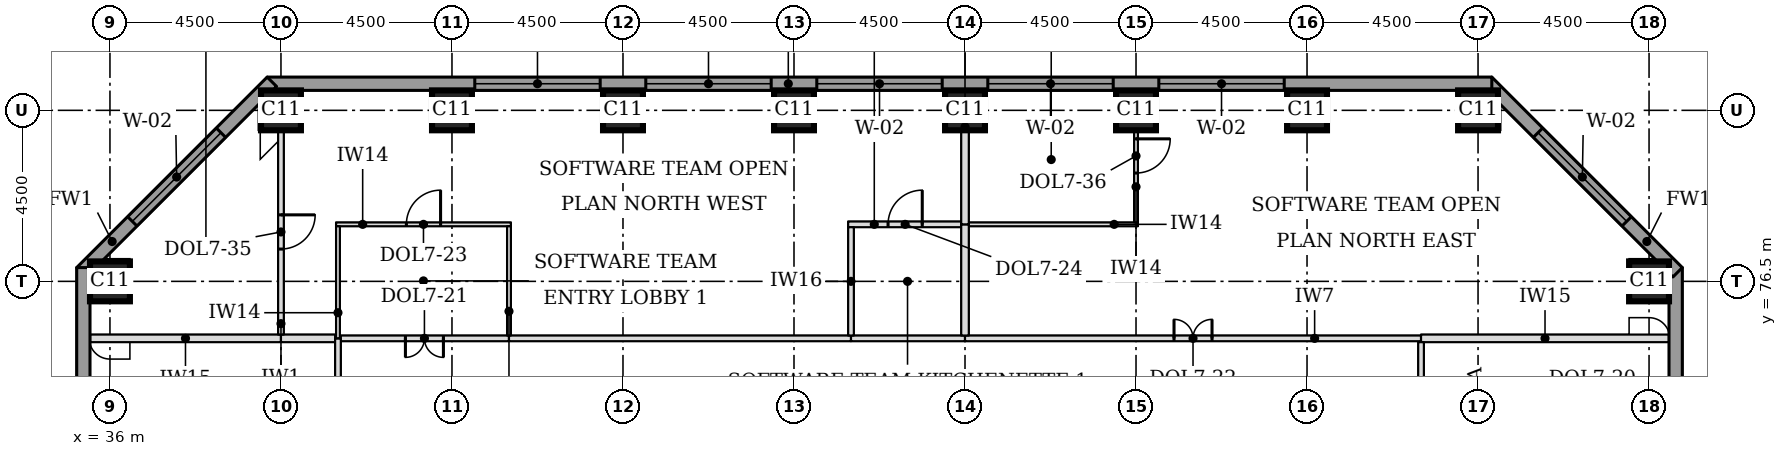
"""IFC4 building model, lengths in metres.
Left out: names, types, materials, properties, quantities, classifications, styles, units other than length and angle.
Written with IfcOpenShell. Run it as: python <this file> out.ifc"""

import sys

from ifc_helpers import new_model, si_unit, direction, frame, frame_2d, origin, origin_2d, place, context, subcontext, project, spatial, rectangle, extrude, element, fill, save


model = new_model("IFC4")
c1 = context("Model", 3, precision=1e-05, world=origin(), true_north=direction((0.0, 1.0)))
c2 = subcontext(c1, "Body", "Model", "MODEL_VIEW")
j1 = project(units=[si_unit("LENGTHUNIT", "METRE"), si_unit("PLANEANGLEUNIT", "RADIAN")], contexts=[c1])
p1 = place(None, origin())
s1 = spatial("IfcSite", under=j1, at=p1, CompositionType="ELEMENT")
p2 = place(p1, origin())
s2 = spatial("IfcBuilding", under=s1, at=p2, CompositionType="ELEMENT")
p3 = place(p2, frame((0.0, 0.0, 134.4)))
s3 = spatial("IfcBuildingStorey", under=s2, at=p3, CompositionType="ELEMENT", Elevation=134.4)
for number, where, z_axis, x_axis in (
    (1, (36.0, 76.5, 0.0), (0.0, 0.0, 1.0), (1.0, 0.0, 0.0)),
    (2, (76.5, 76.5, 0.0), (0.0, 0.0, 1.0), (1.0, 0.0, 0.0)),
    (3, (40.5, 81.0, 0.0), (0.0, 0.0, 1.0), (1.0, 0.0, 0.0)),
    (4, (45.0, 81.0, 0.0), (0.0, 0.0, 1.0), (1.0, 0.0, 0.0)),
    (5, (49.5, 81.0, 0.0), (0.0, 0.0, 1.0), (1.0, 0.0, 0.0)),
    (6, (54.0, 81.0, 0.0), (0.0, 0.0, 1.0), (1.0, 0.0, 0.0)),
    (7, (58.5, 81.0, 0.0), (0.0, 0.0, 1.0), (1.0, 0.0, 0.0)),
    (8, (63.0, 81.0, 0.0), (0.0, 0.0, 1.0), (1.0, 0.0, 0.0)),
    (9, (67.5, 81.0, 0.0), (0.0, 0.0, 1.0), (1.0, 0.0, 0.0)),
    (10, (72.0, 81.0, 0.0), (0.0, 0.0, 1.0), (1.0, 0.0, 0.0)),
):
    element("IfcColumn", number, at=place(p3, frame(where, z_axis=z_axis, x_axis=x_axis)), inside=s3, PredefinedType="COLUMN", context=c2, shape_type="SweptSolid", body=[
        extrude(rectangle(XDim=1.05, YDim=1.05, at=origin_2d()), origin(), (0.0, 0.0, 1.0), 3.7),
    ])
p4 = place(p3, frame((77.2, 44.638, 0.0), z_axis=(0.0, 0.0, 1.0), x_axis=(0.0, 1.0, 0.0)))
e11 = element("IfcWall", 11, at=p4, inside=s3, PredefinedType="STANDARD", context=c2, shape_type="SweptSolid", body=[
    extrude(rectangle(XDim=32.225, YDim=0.35, at=frame_2d((16.112, 0.0))), origin(), (0.0, 0.0, 1.0), 3.525),
])
p5 = place(p4, frame((5.462, 0.0, 0.9)))
e12 = element("IfcOpeningElement", 12, at=p5, cuts=e11, PredefinedType="OPENING", context=c2, shape_type="SweptSolid", body=[
    extrude(rectangle(XDim=3.3, YDim=1.9, at=frame_2d((1.65, 0.95))), frame((0.0, 0.185, 0.0), z_axis=(0.0, -1.0, 0.0), x_axis=(1.0, 0.0, 0.0)), (0.0, 0.0, 1.0), 0.37),
])
p6 = place(p4, frame((9.962, 0.0, 0.9)))
e13 = element("IfcOpeningElement", 13, at=p6, cuts=e11, PredefinedType="OPENING", context=c2, shape_type="SweptSolid", body=[
    extrude(rectangle(XDim=3.3, YDim=1.9, at=frame_2d((1.65, 0.95))), frame((0.0, 0.185, 0.0), z_axis=(0.0, -1.0, 0.0), x_axis=(1.0, 0.0, 0.0)), (0.0, 0.0, 1.0), 0.37),
])
p7 = place(p4, frame((14.462, 0.0, 0.9)))
e14 = element("IfcOpeningElement", 14, at=p7, cuts=e11, PredefinedType="OPENING", context=c2, shape_type="SweptSolid", body=[
    extrude(rectangle(XDim=3.3, YDim=1.9, at=frame_2d((1.65, 0.95))), frame((0.0, 0.185, 0.0), z_axis=(0.0, -1.0, 0.0), x_axis=(1.0, 0.0, 0.0)), (0.0, 0.0, 1.0), 0.37),
])
p8 = place(p4, frame((18.962, 0.0, 0.9)))
e15 = element("IfcOpeningElement", 15, at=p8, cuts=e11, PredefinedType="OPENING", context=c2, shape_type="SweptSolid", body=[
    extrude(rectangle(XDim=3.3, YDim=1.9, at=frame_2d((1.65, 0.95))), frame((0.0, 0.185, 0.0), z_axis=(0.0, -1.0, 0.0), x_axis=(1.0, 0.0, 0.0)), (0.0, 0.0, 1.0), 0.37),
])
p9 = place(p4, frame((23.462, 0.0, 0.9)))
e16 = element("IfcOpeningElement", 16, at=p9, cuts=e11, PredefinedType="OPENING", context=c2, shape_type="SweptSolid", body=[
    extrude(rectangle(XDim=3.3, YDim=1.9, at=frame_2d((1.65, 0.95))), frame((0.0, 0.185, 0.0), z_axis=(0.0, -1.0, 0.0), x_axis=(1.0, 0.0, 0.0)), (0.0, 0.0, 1.0), 0.37),
])
p10 = place(p3, frame((77.251, 76.739, 0.0), z_axis=(0.0, 0.0, 1.0), x_axis=(-0.707106781187, 0.707106781187, 0.0)))
e17 = element("IfcWall", 17, at=p10, inside=s3, PredefinedType="STANDARD", context=c2, shape_type="SweptSolid", body=[
    extrude(rectangle(XDim=7.089, YDim=0.35, at=frame_2d((3.544, 0.0))), origin(), (0.0, 0.0, 1.0), 3.525),
])
p11 = place(p10, frame((1.894, 0.0, 0.9)))
e18 = element("IfcOpeningElement", 18, at=p11, cuts=e17, PredefinedType="OPENING", context=c2, shape_type="SweptSolid", body=[
    extrude(rectangle(XDim=3.3, YDim=1.9, at=frame_2d((1.65, 0.95))), frame((0.0, 0.185, 0.0), z_axis=(0.0, -1.0, 0.0), x_axis=(1.0, 0.0, 0.0)), (0.0, 0.0, 1.0), 0.37),
])
p12 = place(p3, frame((72.362, 81.7, 0.0), z_axis=(0.0, 0.0, 1.0), x_axis=(-1.0, 0.0, 0.0)))
e19 = element("IfcWall", 19, at=p12, inside=s3, PredefinedType="STANDARD", context=c2, shape_type="SweptSolid", body=[
    extrude(rectangle(XDim=32.225, YDim=0.35, at=frame_2d((16.112, 0.0))), origin(), (0.0, 0.0, 1.0), 3.525),
])
p13 = place(p12, frame((5.462, 0.0, 0.9)))
e20 = element("IfcOpeningElement", 20, at=p13, cuts=e19, PredefinedType="OPENING", context=c2, shape_type="SweptSolid", body=[
    extrude(rectangle(XDim=3.3, YDim=1.9, at=frame_2d((1.65, 0.95))), frame((0.0, 0.185, 0.0), z_axis=(0.0, -1.0, 0.0), x_axis=(1.0, 0.0, 0.0)), (0.0, 0.0, 1.0), 0.37),
])
p14 = place(p12, frame((9.962, 0.0, 0.9)))
e21 = element("IfcOpeningElement", 21, at=p14, cuts=e19, PredefinedType="OPENING", context=c2, shape_type="SweptSolid", body=[
    extrude(rectangle(XDim=3.3, YDim=1.9, at=frame_2d((1.65, 0.95))), frame((0.0, 0.185, 0.0), z_axis=(0.0, -1.0, 0.0), x_axis=(1.0, 0.0, 0.0)), (0.0, 0.0, 1.0), 0.37),
])
p15 = place(p12, frame((14.462, 0.0, 0.9)))
e22 = element("IfcOpeningElement", 22, at=p15, cuts=e19, PredefinedType="OPENING", context=c2, shape_type="SweptSolid", body=[
    extrude(rectangle(XDim=3.3, YDim=1.9, at=frame_2d((1.65, 0.95))), frame((0.0, 0.185, 0.0), z_axis=(0.0, -1.0, 0.0), x_axis=(1.0, 0.0, 0.0)), (0.0, 0.0, 1.0), 0.37),
])
p16 = place(p12, frame((18.962, 0.0, 0.9)))
e23 = element("IfcOpeningElement", 23, at=p16, cuts=e19, PredefinedType="OPENING", context=c2, shape_type="SweptSolid", body=[
    extrude(rectangle(XDim=3.3, YDim=1.9, at=frame_2d((1.65, 0.95))), frame((0.0, 0.185, 0.0), z_axis=(0.0, -1.0, 0.0), x_axis=(1.0, 0.0, 0.0)), (0.0, 0.0, 1.0), 0.37),
])
p17 = place(p12, frame((23.462, 0.0, 0.9)))
e24 = element("IfcOpeningElement", 24, at=p17, cuts=e19, PredefinedType="OPENING", context=c2, shape_type="SweptSolid", body=[
    extrude(rectangle(XDim=3.3, YDim=1.9, at=frame_2d((1.65, 0.95))), frame((0.0, 0.185, 0.0), z_axis=(0.0, -1.0, 0.0), x_axis=(1.0, 0.0, 0.0)), (0.0, 0.0, 1.0), 0.37),
])
p18 = place(p3, frame((40.261, 81.751, 0.0), z_axis=(0.0, 0.0, 1.0), x_axis=(-0.707106781187, -0.707106781187, 0.0)))
e25 = element("IfcWall", 25, at=p18, inside=s3, PredefinedType="STANDARD", context=c2, shape_type="SweptSolid", body=[
    extrude(rectangle(XDim=7.089, YDim=0.35, at=frame_2d((3.544, 0.0))), origin(), (0.0, 0.0, 1.0), 3.525),
])
p19 = place(p18, frame((1.894, 0.0, 0.9)))
e26 = element("IfcOpeningElement", 26, at=p19, cuts=e25, PredefinedType="OPENING", context=c2, shape_type="SweptSolid", body=[
    extrude(rectangle(XDim=3.3, YDim=1.9, at=frame_2d((1.65, 0.95))), frame((0.0, 0.185, 0.0), z_axis=(0.0, -1.0, 0.0), x_axis=(1.0, 0.0, 0.0)), (0.0, 0.0, 1.0), 0.37),
])
p20 = place(p3, frame((35.3, 76.862, 0.0), z_axis=(0.0, 0.0, 1.0), x_axis=(0.0, -1.0, 0.0)))
e27 = element("IfcWall", 27, at=p20, inside=s3, PredefinedType="STANDARD", context=c2, shape_type="SweptSolid", body=[
    extrude(rectangle(XDim=13.337, YDim=0.35, at=frame_2d((6.669, 0.0))), origin(), (0.0, 0.0, 1.0), 3.525),
])
p21 = place(p20, frame((9.537, 0.0, 0.9)))
e28 = element("IfcOpeningElement", 28, at=p21, cuts=e27, PredefinedType="OPENING", context=c2, shape_type="SweptSolid", body=[
    extrude(rectangle(XDim=3.3, YDim=1.9, at=frame_2d((1.65, 0.95))), frame((0.0, 0.185, 0.0), z_axis=(0.0, -1.0, 0.0), x_axis=(1.0, 0.0, 0.0)), (0.0, 0.0, 1.0), 0.37),
])
p22 = place(p3, frame((35.475, 75.0, 0.0), z_axis=(0.0, 0.0, 1.0), x_axis=(1.0, 0.0, 0.0)))
e29 = element("IfcWall", 29, at=p22, inside=s3, PredefinedType="PARTITIONING", context=c2, shape_type="SweptSolid", body=[
    extrude(rectangle(XDim=5.025, YDim=0.2, at=frame_2d((2.512, 0.0))), origin(), (0.0, 0.0, 1.0), 3.55),
])
p23 = place(p3, frame((40.5, 75.0, 0.0), z_axis=(0.0, 0.0, 1.0), x_axis=(1.0, 0.0, 0.0)))
e30 = element("IfcWall", 30, at=p23, inside=s3, PredefinedType="PARTITIONING", context=c2, shape_type="SweptSolid", body=[
    extrude(rectangle(XDim=1.425, YDim=0.2, at=frame_2d((0.712, 0.0))), origin(), (0.0, 0.0, 1.0), 3.55),
])
p24 = place(p3, frame((42.075, 75.0, 0.0), z_axis=(0.0, 0.0, 1.0), x_axis=(1.0, 0.0, 0.0)))
e31 = element("IfcWall", 31, at=p24, inside=s3, PredefinedType="PARTITIONING", context=c2, shape_type="SweptSolid", body=[
    extrude(rectangle(XDim=4.425, YDim=0.15, at=frame_2d((2.212, 0.0))), origin(), (0.0, 0.0, 1.0), 3.55),
])
p25 = place(p24, frame((1.7, 0.0, 0.0)))
e32 = element("IfcOpeningElement", 32, at=p25, cuts=e31, PredefinedType="OPENING", context=c2, shape_type="SweptSolid", body=[
    extrude(rectangle(XDim=1.0, YDim=2.1, at=frame_2d((0.5, 1.05))), frame((0.0, 0.085, 0.0), z_axis=(0.0, -1.0, 0.0), x_axis=(1.0, 0.0, 0.0)), (0.0, 0.0, 1.0), 0.17),
])
p26 = place(p3, frame((46.5, 75.0, 0.0), z_axis=(0.0, 0.0, 1.0), x_axis=(1.0, 0.0, 0.0)))
e33 = element("IfcWall", 33, at=p26, inside=s3, PredefinedType="PARTITIONING", context=c2, shape_type="SweptSolid", body=[
    extrude(rectangle(XDim=9.0, YDim=0.15, at=frame_2d((4.5, 0.0))), origin(), (0.0, 0.0, 1.0), 3.55),
])
p27 = place(p3, frame((55.5, 75.0, 0.0), z_axis=(0.0, 0.0, 1.0), x_axis=(1.0, 0.0, 0.0)))
e34 = element("IfcWall", 34, at=p27, inside=s3, PredefinedType="PARTITIONING", context=c2, shape_type="SweptSolid", body=[
    extrude(rectangle(XDim=3.0, YDim=0.15, at=frame_2d((1.5, 0.0))), origin(), (0.0, 0.0, 1.0), 3.55),
])
p28 = place(p3, frame((58.5, 75.0, 0.0), z_axis=(0.0, 0.0, 1.0), x_axis=(1.0, 0.0, 0.0)))
e35 = element("IfcWall", 35, at=p28, inside=s3, PredefinedType="PARTITIONING", context=c2, shape_type="SweptSolid", body=[
    extrude(rectangle(XDim=12.0, YDim=0.15, at=frame_2d((6.0, 0.0))), origin(), (0.0, 0.0, 1.0), 3.55),
])
p29 = place(p28, frame((5.5, 0.0, 0.0)))
e36 = element("IfcOpeningElement", 36, at=p29, cuts=e35, PredefinedType="OPENING", context=c2, shape_type="SweptSolid", body=[
    extrude(rectangle(XDim=1.0, YDim=2.1, at=frame_2d((0.5, 1.05))), frame((0.0, 0.085, 0.0), z_axis=(0.0, -1.0, 0.0), x_axis=(1.0, 0.0, 0.0)), (0.0, 0.0, 1.0), 0.17),
])
p30 = place(p3, frame((70.5, 75.0, 0.0), z_axis=(0.0, 0.0, 1.0), x_axis=(1.0, 0.0, 0.0)))
e37 = element("IfcWall", 37, at=p30, inside=s3, PredefinedType="PARTITIONING", context=c2, shape_type="SweptSolid", body=[
    extrude(rectangle(XDim=6.525, YDim=0.2, at=frame_2d((3.262, 0.0))), origin(), (0.0, 0.0, 1.0), 3.55),
])
p31 = place(p3, frame((41.95, 78.0, 0.0), z_axis=(0.0, 0.0, 1.0), x_axis=(1.0, 0.0, 0.0)))
e38 = element("IfcWall", 38, at=p31, inside=s3, PredefinedType="PARTITIONING", context=c2, shape_type="SweptSolid", body=[
    extrude(rectangle(XDim=4.6, YDim=0.1, at=frame_2d((2.3, 0.0))), origin(), (0.0, 0.0, 1.0), 3.55),
])
p32 = place(p31, frame((1.85, 0.0, 0.0)))
e39 = element("IfcOpeningElement", 39, at=p32, cuts=e38, PredefinedType="OPENING", context=c2, shape_type="SweptSolid", body=[
    extrude(rectangle(XDim=0.9, YDim=2.1, at=frame_2d((0.45, 1.05))), frame((0.0, 0.06, 0.0), z_axis=(0.0, -1.0, 0.0), x_axis=(1.0, 0.0, 0.0)), (0.0, 0.0, 1.0), 0.12),
])
p33 = place(p3, frame((55.425, 78.0, 0.0), z_axis=(0.0, 0.0, 1.0), x_axis=(1.0, 0.0, 0.0)))
e40 = element("IfcWall", 40, at=p33, inside=s3, PredefinedType="PARTITIONING", context=c2, shape_type="SweptSolid", body=[
    extrude(rectangle(XDim=2.975, YDim=0.15, at=frame_2d((1.487, 0.0))), origin(), (0.0, 0.0, 1.0), 3.55),
])
p34 = place(p33, frame((1.05, 0.0, 0.0)))
e41 = element("IfcOpeningElement", 41, at=p34, cuts=e40, PredefinedType="OPENING", context=c2, shape_type="SweptSolid", body=[
    extrude(rectangle(XDim=0.9, YDim=2.1, at=frame_2d((0.45, 1.05))), frame((0.0, 0.085, 0.0), z_axis=(0.0, -1.0, 0.0), x_axis=(1.0, 0.0, 0.0)), (0.0, 0.0, 1.0), 0.17),
])
p35 = place(p3, frame((58.6, 78.0, 0.0), z_axis=(0.0, 0.0, 1.0), x_axis=(1.0, 0.0, 0.0)))
e42 = element("IfcWall", 42, at=p35, inside=s3, PredefinedType="PARTITIONING", context=c2, shape_type="SweptSolid", body=[
    extrude(rectangle(XDim=4.45, YDim=0.1, at=frame_2d((2.225, 0.0))), origin(), (0.0, 0.0, 1.0), 3.55),
])
p36 = place(p3, frame((42.0, 57.075, 0.0), z_axis=(0.0, 0.0, 1.0), x_axis=(0.0, 1.0, 0.0)))
e43 = element("IfcWall", 43, at=p36, inside=s3, PredefinedType="PARTITIONING", context=c2, shape_type="SweptSolid", body=[
    extrude(rectangle(XDim=17.925, YDim=0.15, at=frame_2d((8.962, 0.0))), origin(), (0.0, 0.0, 1.0), 3.55),
])
p37 = place(p3, frame((70.5, 63.0, 0.0), z_axis=(0.0, 0.0, 1.0), x_axis=(0.0, 1.0, 0.0)))
e44 = element("IfcWall", 44, at=p37, inside=s3, PredefinedType="PARTITIONING", context=c2, shape_type="SweptSolid", body=[
    extrude(rectangle(XDim=11.9, YDim=0.15, at=frame_2d((5.95, 0.0))), origin(), (0.0, 0.0, 1.0), 3.55),
])
p38 = place(p37, frame((5.45, 0.0, 0.0)))
e45 = element("IfcOpeningElement", 45, at=p38, cuts=e44, PredefinedType="OPENING", context=c2, shape_type="SweptSolid", body=[
    extrude(rectangle(XDim=1.0, YDim=2.1, at=frame_2d((0.5, 1.05))), frame((0.0, 0.085, 0.0), z_axis=(0.0, -1.0, 0.0), x_axis=(1.0, 0.0, 0.0)), (0.0, 0.0, 1.0), 0.17),
])
p39 = place(p3, frame((42.0, 75.0, 0.0), z_axis=(0.0, 0.0, 1.0), x_axis=(0.0, 1.0, 0.0)))
e46 = element("IfcWall", 46, at=p39, inside=s3, PredefinedType="PARTITIONING", context=c2, shape_type="SweptSolid", body=[
    extrude(rectangle(XDim=2.95, YDim=0.1, at=frame_2d((1.475, 0.0))), origin(), (0.0, 0.0, 1.0), 3.55),
])
p40 = place(p3, frame((46.5, 75.075, 0.0), z_axis=(0.0, 0.0, 1.0), x_axis=(0.0, 1.0, 0.0)))
e47 = element("IfcWall", 47, at=p40, inside=s3, PredefinedType="PARTITIONING", context=c2, shape_type="SweptSolid", body=[
    extrude(rectangle(XDim=2.875, YDim=0.1, at=frame_2d((1.438, 0.0))), origin(), (0.0, 0.0, 1.0), 2.948),
])
p41 = place(p3, frame((55.5, 75.075, 0.0), z_axis=(0.0, 0.0, 1.0), x_axis=(0.0, 1.0, 0.0)))
e48 = element("IfcWall", 48, at=p41, inside=s3, PredefinedType="PARTITIONING", context=c2, shape_type="SweptSolid", body=[
    extrude(rectangle(XDim=2.85, YDim=0.15, at=frame_2d((1.425, 0.0))), origin(), (0.0, 0.0, 1.0), 3.55),
])
p42 = place(p3, frame((58.5, 75.075, 0.0), z_axis=(0.0, 0.0, 1.0), x_axis=(0.0, 1.0, 0.0)))
e49 = element("IfcWall", 49, at=p42, inside=s3, PredefinedType="PARTITIONING", context=c2, shape_type="SweptSolid", body=[
    extrude(rectangle(XDim=2.925, YDim=0.2, at=frame_2d((1.462, 0.0))), origin(), (0.0, 0.0, 1.0), 3.55),
])
p43 = place(p3, frame((40.5, 75.1, 0.0), z_axis=(0.0, 0.0, 1.0), x_axis=(0.0, 1.0, 0.0)))
e50 = element("IfcWall", 50, at=p43, inside=s3, PredefinedType="PARTITIONING", context=c2, shape_type="SweptSolid", body=[
    extrude(rectangle(XDim=5.375, YDim=0.15, at=frame_2d((2.688, 0.0))), origin(), (0.0, 0.0, 1.0), 3.55),
])
p44 = place(p43, frame((2.25, 0.0, 0.0)))
e51 = element("IfcOpeningElement", 51, at=p44, cuts=e50, PredefinedType="OPENING", context=c2, shape_type="SweptSolid", body=[
    extrude(rectangle(XDim=0.9, YDim=2.1, at=frame_2d((0.45, 1.05))), frame((0.0, 0.085, 0.0), z_axis=(0.0, -1.0, 0.0), x_axis=(1.0, 0.0, 0.0)), (0.0, 0.0, 1.0), 0.17),
])
p45 = place(p3, frame((58.5, 78.0, 0.0), z_axis=(0.0, 0.0, 1.0), x_axis=(0.0, 1.0, 0.0)))
e52 = element("IfcWall", 52, at=p45, inside=s3, PredefinedType="PARTITIONING", context=c2, shape_type="SweptSolid", body=[
    extrude(rectangle(XDim=3.525, YDim=0.2, at=frame_2d((1.762, 0.0))), origin(), (0.0, 0.0, 1.0), 3.55),
])
p46 = place(p3, frame((63.0, 78.05, 0.0), z_axis=(0.0, 0.0, 1.0), x_axis=(0.0, 1.0, 0.0)))
e53 = element("IfcWall", 53, at=p46, inside=s3, PredefinedType="PARTITIONING", context=c2, shape_type="SweptSolid", body=[
    extrude(rectangle(XDim=3.475, YDim=0.1, at=frame_2d((1.737, 0.0))), origin(), (0.0, 0.0, 1.0), 3.55),
])
p47 = place(p46, frame((1.3, 0.0, 0.0)))
e54 = element("IfcOpeningElement", 54, at=p47, cuts=e53, PredefinedType="OPENING", context=c2, shape_type="SweptSolid", body=[
    extrude(rectangle(XDim=0.9, YDim=2.1, at=frame_2d((0.45, 1.05))), frame((0.0, 0.06, 0.0), z_axis=(0.0, -1.0, 0.0), x_axis=(1.0, 0.0, 0.0)), (0.0, 0.0, 1.0), 0.12),
])
p48 = place(p11, origin())
e55 = element("IfcWindow", 55, at=p48, inside=s3, PartitioningType="SINGLE_PANEL", PredefinedType="WINDOW", context=c2, shape_type="SweptSolid", body=[
    extrude(rectangle(XDim=3.3, YDim=1.9, at=frame_2d((1.65, 0.95))), frame((0.0, 0.085, 0.0), z_axis=(0.0, -1.0, 0.0), x_axis=(1.0, 0.0, 0.0)), (0.0, 0.0, 1.0), 0.06),
])
fill(e18, e55)
p49 = place(p13, origin())
e56 = element("IfcWindow", 56, at=p49, inside=s3, PartitioningType="SINGLE_PANEL", PredefinedType="WINDOW", context=c2, shape_type="SweptSolid", body=[
    extrude(rectangle(XDim=3.3, YDim=1.9, at=frame_2d((1.65, 0.95))), frame((0.0, 0.085, 0.0), z_axis=(0.0, -1.0, 0.0), x_axis=(1.0, 0.0, 0.0)), (0.0, 0.0, 1.0), 0.06),
])
fill(e20, e56)
p50 = place(p14, origin())
e57 = element("IfcWindow", 57, at=p50, inside=s3, PartitioningType="SINGLE_PANEL", PredefinedType="WINDOW", context=c2, shape_type="SweptSolid", body=[
    extrude(rectangle(XDim=3.3, YDim=1.9, at=frame_2d((1.65, 0.95))), frame((0.0, 0.085, 0.0), z_axis=(0.0, -1.0, 0.0), x_axis=(1.0, 0.0, 0.0)), (0.0, 0.0, 1.0), 0.06),
])
fill(e21, e57)
p51 = place(p15, origin())
e58 = element("IfcWindow", 58, at=p51, inside=s3, PartitioningType="SINGLE_PANEL", PredefinedType="WINDOW", context=c2, shape_type="SweptSolid", body=[
    extrude(rectangle(XDim=3.3, YDim=1.9, at=frame_2d((1.65, 0.95))), frame((0.0, 0.085, 0.0), z_axis=(0.0, -1.0, 0.0), x_axis=(1.0, 0.0, 0.0)), (0.0, 0.0, 1.0), 0.06),
])
fill(e22, e58)
p52 = place(p16, origin())
e59 = element("IfcWindow", 59, at=p52, inside=s3, PartitioningType="SINGLE_PANEL", PredefinedType="WINDOW", context=c2, shape_type="SweptSolid", body=[
    extrude(rectangle(XDim=3.3, YDim=1.9, at=frame_2d((1.65, 0.95))), frame((0.0, 0.085, 0.0), z_axis=(0.0, -1.0, 0.0), x_axis=(1.0, 0.0, 0.0)), (0.0, 0.0, 1.0), 0.06),
])
fill(e23, e59)
p53 = place(p17, origin())
e60 = element("IfcWindow", 60, at=p53, inside=s3, PartitioningType="SINGLE_PANEL", PredefinedType="WINDOW", context=c2, shape_type="SweptSolid", body=[
    extrude(rectangle(XDim=3.3, YDim=1.9, at=frame_2d((1.65, 0.95))), frame((0.0, 0.085, 0.0), z_axis=(0.0, -1.0, 0.0), x_axis=(1.0, 0.0, 0.0)), (0.0, 0.0, 1.0), 0.06),
])
fill(e24, e60)
p54 = place(p19, origin())
e61 = element("IfcWindow", 61, at=p54, inside=s3, PartitioningType="SINGLE_PANEL", PredefinedType="WINDOW", context=c2, shape_type="SweptSolid", body=[
    extrude(rectangle(XDim=3.3, YDim=1.9, at=frame_2d((1.65, 0.95))), frame((0.0, 0.085, 0.0), z_axis=(0.0, -1.0, 0.0), x_axis=(1.0, 0.0, 0.0)), (0.0, 0.0, 1.0), 0.06),
])
fill(e26, e61)
p55 = place(p25, frame((1.0, 0.0, 0.0), z_axis=(0.0, 0.0, 1.0), x_axis=(-1.0, 0.0, 0.0)))
e62 = element("IfcDoor", 62, at=p55, inside=s3, OperationType="DOUBLE_DOOR_SINGLE_SWING", PredefinedType="DOOR", context=c2, shape_type="SweptSolid", body=[
    extrude(rectangle(XDim=1.0, YDim=2.1, at=frame_2d((0.5, 1.05))), frame((0.0, 0.025, 0.0), z_axis=(0.0, -1.0, 0.0), x_axis=(1.0, 0.0, 0.0)), (0.0, 0.0, 1.0), 0.05),
])
fill(e32, e62)
p56 = place(p32, origin())
e63 = element("IfcDoor", 63, at=p56, inside=s3, OperationType="SINGLE_SWING_RIGHT", PredefinedType="DOOR", context=c2, shape_type="SweptSolid", body=[
    extrude(rectangle(XDim=0.9, YDim=2.1, at=frame_2d((0.45, 1.05))), frame((0.0, 0.025, 0.0), z_axis=(0.0, -1.0, 0.0), x_axis=(1.0, 0.0, 0.0)), (0.0, 0.0, 1.0), 0.05),
])
fill(e39, e63)
p57 = place(p34, origin())
e64 = element("IfcDoor", 64, at=p57, inside=s3, OperationType="SINGLE_SWING_RIGHT", PredefinedType="DOOR", context=c2, shape_type="SweptSolid", body=[
    extrude(rectangle(XDim=0.9, YDim=2.1, at=frame_2d((0.45, 1.05))), frame((0.0, 0.025, 0.0), z_axis=(0.0, -1.0, 0.0), x_axis=(1.0, 0.0, 0.0)), (0.0, 0.0, 1.0), 0.05),
])
fill(e41, e64)
p58 = place(p44, frame((0.9, 0.0, 0.0), z_axis=(0.0, 0.0, 1.0), x_axis=(-1.0, 0.0, 0.0)))
e65 = element("IfcDoor", 65, at=p58, inside=s3, OperationType="SINGLE_SWING_LEFT", PredefinedType="DOOR", context=c2, shape_type="SweptSolid", body=[
    extrude(rectangle(XDim=0.9, YDim=2.1, at=frame_2d((0.45, 1.05))), frame((0.0, 0.025, 0.0), z_axis=(0.0, -1.0, 0.0), x_axis=(1.0, 0.0, 0.0)), (0.0, 0.0, 1.0), 0.05),
])
fill(e51, e65)
p59 = place(p29, origin())
e66 = element("IfcDoor", 66, at=p59, inside=s3, OperationType="DOUBLE_DOOR_SINGLE_SWING", PredefinedType="DOOR", context=c2, shape_type="SweptSolid", body=[
    extrude(rectangle(XDim=1.0, YDim=2.1, at=frame_2d((0.5, 1.05))), frame((0.0, 0.025, 0.0), z_axis=(0.0, -1.0, 0.0), x_axis=(1.0, 0.0, 0.0)), (0.0, 0.0, 1.0), 0.05),
])
fill(e36, e66)
p60 = place(p47, frame((0.9, 0.0, 0.0), z_axis=(0.0, 0.0, 1.0), x_axis=(-1.0, 0.0, 0.0)))
e67 = element("IfcDoor", 67, at=p60, inside=s3, OperationType="SINGLE_SWING_LEFT", PredefinedType="DOOR", context=c2, shape_type="SweptSolid", body=[
    extrude(rectangle(XDim=0.9, YDim=2.1, at=frame_2d((0.45, 1.05))), frame((0.0, 0.025, 0.0), z_axis=(0.0, -1.0, 0.0), x_axis=(1.0, 0.0, 0.0)), (0.0, 0.0, 1.0), 0.05),
])
fill(e54, e67)
save(model, sys.argv[1])
